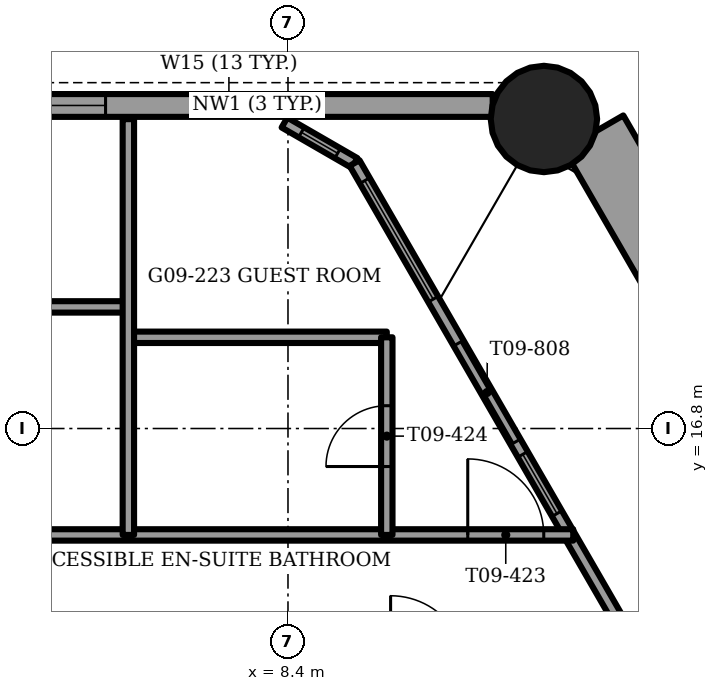
"""IFC4 building model, lengths in metres.
Left out: names, types, materials, properties, quantities, classifications, styles, units other than length and angle.
Written with IfcOpenShell. Run it as: python <this file> out.ifc"""

import sys

from ifc_helpers import new_model, si_unit, direction, frame, frame_2d, origin, origin_2d, place, context, subcontext, project, spatial, rectangle, circle, extrude, element, fill, save


model = new_model("IFC4")
c1 = context("Model", 3, precision=1e-05, world=origin(), true_north=direction((0.0, 1.0)))
c2 = subcontext(c1, "Body", "Model", "MODEL_VIEW")
j1 = project(units=[si_unit("LENGTHUNIT", "METRE"), si_unit("PLANEANGLEUNIT", "RADIAN")], contexts=[c1])
p1 = place(None, origin())
s1 = spatial("IfcSite", under=j1, at=p1, CompositionType="ELEMENT")
p2 = place(p1, origin())
s2 = spatial("IfcBuilding", under=s1, at=p2, CompositionType="ELEMENT")
p3 = place(p2, frame((0.0, 0.0, 39.25)))
s3 = spatial("IfcBuildingStorey", under=s2, at=p3, CompositionType="ELEMENT", Elevation=39.25)
p4 = place(p3, frame((11.767, 20.872, -1.2), z_axis=(0.0, 0.0, 1.0), x_axis=(1.0, 0.0, 0.0)))
e1 = element("IfcColumn", 1, at=p4, inside=s3, PredefinedType="COLUMN", context=c2, shape_type="SweptSolid", body=[
    extrude(circle(Radius=0.7, at=origin_2d()), origin(), (0.0, 0.0, 1.0), 3.75),
])
p5 = place(p3, frame((15.844, 14.766, 0.0), z_axis=(0.0, 0.0, 1.0), x_axis=(-0.499994135611, 0.866028789565, 0.0)))
e2 = element("IfcWall", 2, at=p5, inside=s3, PredefinedType="PARAPET", context=c2, shape_type="SweptSolid", body=[
    extrude(rectangle(XDim=6.845, YDim=0.9, at=frame_2d((3.423, 0.0))), origin(), (0.0, 0.0, 1.0), 1.1),
])
p6 = place(p3, frame((11.093, 21.05, 0.0), z_axis=(0.0, 0.0, 1.0), x_axis=(-1.0, 0.0, 0.0)))
e3 = element("IfcWall", 3, at=p6, inside=s3, PredefinedType="SOLIDWALL", context=c2, shape_type="SweptSolid", body=[
    extrude(rectangle(XDim=6.198, YDim=0.3, at=frame_2d((3.099, 0.0))), origin(), (0.0, 0.0, 1.0), 2.55),
])
p7 = place(p6, frame((3.02, 0.0, 0.15)))
e4 = element("IfcOpeningElement", 4, at=p7, cuts=e3, PredefinedType="OPENING", context=c2, shape_type="SweptSolid", body=[
    extrude(rectangle(XDim=0.9, YDim=2.15, at=frame_2d((0.45, 1.075))), frame((0.0, 0.15, 0.0), z_axis=(0.0, -1.0, 0.0), x_axis=(1.0, 0.0, 0.0)), (0.0, 0.0, 1.0), 0.3),
])
p8 = place(p6, frame((5.093, 0.0, 0.15)))
e5 = element("IfcOpeningElement", 5, at=p8, cuts=e3, PredefinedType="OPENING", context=c2, shape_type="SweptSolid", body=[
    extrude(rectangle(XDim=0.9, YDim=2.15, at=frame_2d((0.45, 1.075))), frame((0.0, 0.15, 0.0), z_axis=(0.0, -1.0, 0.0), x_axis=(1.0, 0.0, 0.0)), (0.0, 0.0, 1.0), 0.3),
])
p9 = place(p3, frame((20.826, 0.287, 0.0), z_axis=(0.0, 0.0, 1.0), x_axis=(-0.500006057782, 0.866021906294, 0.0)))
e6 = element("IfcWall", 6, at=p9, inside=s3, PredefinedType="SOLIDWALL", context=c2, shape_type="SweptSolid", body=[
    extrude(rectangle(XDim=23.1, YDim=0.15, at=frame_2d((11.55, 0.0))), origin(), (0.0, 0.0, 1.0), 3.45),
])
p10 = place(p9, frame((4.165, 0.0, 0.15)))
e7 = element("IfcOpeningElement", 7, at=p10, cuts=e6, PredefinedType="OPENING", context=c2, shape_type="SweptSolid", body=[
    extrude(rectangle(XDim=0.9, YDim=2.85, at=frame_2d((0.45, 1.425))), frame((0.0, 0.075, 0.0), z_axis=(0.0, -1.0, 0.0), x_axis=(1.0, 0.0, 0.0)), (0.0, 0.0, 1.0), 0.15),
])
p11 = place(p9, frame((5.645, 0.0, 0.15)))
e8 = element("IfcOpeningElement", 8, at=p11, cuts=e6, PredefinedType="OPENING", context=c2, shape_type="SweptSolid", body=[
    extrude(rectangle(XDim=1.5, YDim=2.85, at=frame_2d((0.75, 1.425))), frame((0.0, 0.075, 0.0), z_axis=(0.0, -1.0, 0.0), x_axis=(1.0, 0.0, 0.0)), (0.0, 0.0, 1.0), 0.15),
])
p12 = place(p9, frame((8.365, 0.0, 0.15)))
e9 = element("IfcOpeningElement", 9, at=p12, cuts=e6, PredefinedType="OPENING", context=c2, shape_type="SweptSolid", body=[
    extrude(rectangle(XDim=1.8, YDim=2.85, at=frame_2d((0.9, 1.425))), frame((0.0, 0.075, 0.0), z_axis=(0.0, -1.0, 0.0), x_axis=(1.0, 0.0, 0.0)), (0.0, 0.0, 1.0), 0.15),
])
p13 = place(p9, frame((10.465, 0.0, 0.15)))
e10 = element("IfcOpeningElement", 10, at=p13, cuts=e6, PredefinedType="OPENING", context=c2, shape_type="SweptSolid", body=[
    extrude(rectangle(XDim=1.5, YDim=2.85, at=frame_2d((0.75, 1.425))), frame((0.0, 0.075, 0.0), z_axis=(0.0, -1.0, 0.0), x_axis=(1.0, 0.0, 0.0)), (0.0, 0.0, 1.0), 0.15),
])
p14 = place(p9, frame((12.564, 0.0, 0.15)))
e11 = element("IfcOpeningElement", 11, at=p14, cuts=e6, PredefinedType="OPENING", context=c2, shape_type="SweptSolid", body=[
    extrude(rectangle(XDim=0.9, YDim=2.85, at=frame_2d((0.45, 1.425))), frame((0.0, 0.075, 0.0), z_axis=(0.0, -1.0, 0.0), x_axis=(1.0, 0.0, 0.0)), (0.0, 0.0, 1.0), 0.15),
])
p15 = place(p9, frame((14.665, 0.0, 0.15)))
e12 = element("IfcOpeningElement", 12, at=p15, cuts=e6, PredefinedType="OPENING", context=c2, shape_type="SweptSolid", body=[
    extrude(rectangle(XDim=1.5, YDim=2.85, at=frame_2d((0.75, 1.425))), frame((0.0, 0.075, 0.0), z_axis=(0.0, -1.0, 0.0), x_axis=(1.0, 0.0, 0.0)), (0.0, 0.0, 1.0), 0.15),
])
p16 = place(p9, frame((17.775, 0.0, 0.15)))
e13 = element("IfcOpeningElement", 13, at=p16, cuts=e6, PredefinedType="OPENING", context=c2, shape_type="SweptSolid", body=[
    extrude(rectangle(XDim=0.9, YDim=2.85, at=frame_2d((0.45, 1.425))), frame((0.0, 0.075, 0.0), z_axis=(0.0, -1.0, 0.0), x_axis=(1.0, 0.0, 0.0)), (0.0, 0.0, 1.0), 0.15),
])
p17 = place(p9, frame((18.865, 0.0, 0.0)))
e14 = element("IfcOpeningElement", 14, at=p17, cuts=e6, PredefinedType="OPENING", context=c2, shape_type="SweptSolid", body=[
    extrude(rectangle(XDim=1.5, YDim=2.4, at=frame_2d((0.75, 1.2))), frame((0.0, 0.075, 0.0), z_axis=(0.0, -1.0, 0.0), x_axis=(1.0, 0.0, 0.0)), (0.0, 0.0, 1.0), 0.15),
])
p18 = place(p9, frame((0.322, 0.0, 0.15)))
e15 = element("IfcOpeningElement", 15, at=p18, cuts=e6, PredefinedType="OPENING", context=c2, shape_type="SweptSolid", body=[
    extrude(rectangle(XDim=1.8, YDim=2.73, at=frame_2d((0.9, 1.365))), frame((0.0, 0.075, 0.0), z_axis=(0.0, -1.0, 0.0), x_axis=(1.0, 0.0, 0.0)), (0.0, 0.0, 1.0), 0.15),
])
p19 = place(p9, frame((21.032, 0.0, 0.15)))
e16 = element("IfcOpeningElement", 16, at=p19, cuts=e6, PredefinedType="OPENING", context=c2, shape_type="SweptSolid", body=[
    extrude(rectangle(XDim=1.8, YDim=2.73, at=frame_2d((0.9, 1.365))), frame((0.0, 0.075, 0.0), z_axis=(0.0, -1.0, 0.0), x_axis=(1.0, 0.0, 0.0)), (0.0, 0.0, 1.0), 0.15),
])
p20 = place(p3, frame((9.276, 20.292, 0.0), z_axis=(0.0, 0.0, 1.0), x_axis=(-0.865990848561, 0.500059846627, 0.0)))
e17 = element("IfcWall", 17, at=p20, inside=s3, PredefinedType="SOLIDWALL", context=c2, shape_type="SweptSolid", body=[
    extrude(rectangle(XDim=1.065, YDim=0.15, at=frame_2d((0.532, 0.0))), origin(), (0.0, 0.0, 1.0), 3.45),
])
p21 = place(p20, frame((0.258, 0.0, 0.15)))
e18 = element("IfcOpeningElement", 18, at=p21, cuts=e17, PredefinedType="OPENING", context=c2, shape_type="SweptSolid", body=[
    extrude(rectangle(XDim=0.55, YDim=2.85, at=frame_2d((0.275, 1.425))), frame((0.0, 0.075, 0.0), z_axis=(0.0, -1.0, 0.0), x_axis=(1.0, 0.0, 0.0)), (0.0, 0.0, 1.0), 0.15),
])
p22 = place(p3, frame((-12.153, 15.4, 0.0), z_axis=(0.0, 0.0, 1.0), x_axis=(1.0, 0.0, 0.0)))
e19 = element("IfcWall", 19, at=p22, inside=s3, PredefinedType="PARTITIONING", context=c2, shape_type="SweptSolid", body=[
    extrude(rectangle(XDim=24.306, YDim=0.15, at=frame_2d((12.153, 0.0))), origin(), (0.0, 0.0, 1.0), 3.45),
])
p23 = place(p22, frame((3.353, 0.0, 0.0)))
e20 = element("IfcOpeningElement", 20, at=p23, cuts=e19, PredefinedType="OPENING", context=c2, shape_type="SweptSolid", body=[
    extrude(rectangle(XDim=1.0, YDim=2.1, at=frame_2d((0.5, 1.05))), frame((0.0, 0.075, 0.0), z_axis=(0.0, -1.0, 0.0), x_axis=(1.0, 0.0, 0.0)), (0.0, 0.0, 1.0), 0.15),
])
p24 = place(p22, frame((12.153, 0.0, 0.0)))
e21 = element("IfcOpeningElement", 21, at=p24, cuts=e19, PredefinedType="OPENING", context=c2, shape_type="SweptSolid", body=[
    extrude(rectangle(XDim=1.0, YDim=2.1, at=frame_2d((0.5, 1.05))), frame((0.0, 0.075, 0.0), z_axis=(0.0, -1.0, 0.0), x_axis=(1.0, 0.0, 0.0)), (0.0, 0.0, 1.0), 0.15),
])
p25 = place(p22, frame((14.503, 0.0, 0.0)))
e22 = element("IfcOpeningElement", 22, at=p25, cuts=e19, PredefinedType="OPENING", context=c2, shape_type="SweptSolid", body=[
    extrude(rectangle(XDim=1.0, YDim=2.1, at=frame_2d((0.5, 1.05))), frame((0.0, 0.075, 0.0), z_axis=(0.0, -1.0, 0.0), x_axis=(1.0, 0.0, 0.0)), (0.0, 0.0, 1.0), 0.15),
])
p26 = place(p22, frame((22.918, 0.0, 0.0)))
e23 = element("IfcOpeningElement", 23, at=p26, cuts=e19, PredefinedType="OPENING", context=c2, shape_type="SweptSolid", body=[
    extrude(rectangle(XDim=1.0, YDim=2.1, at=frame_2d((0.5, 1.05))), frame((0.0, 0.075, 0.0), z_axis=(0.0, -1.0, 0.0), x_axis=(1.0, 0.0, 0.0)), (0.0, 0.0, 1.0), 0.15),
])
p27 = place(p3, frame((6.3, 18.0, 0.0), z_axis=(0.0, 0.0, 1.0), x_axis=(1.0, 0.0, 0.0)))
e24 = element("IfcWall", 24, at=p27, inside=s3, PredefinedType="PARTITIONING", context=c2, shape_type="SweptSolid", body=[
    extrude(rectangle(XDim=3.4, YDim=0.15, at=frame_2d((1.7, 0.0))), origin(), (0.0, 0.0, 1.0), 3.45),
])
p28 = place(p3, frame((3.5, 18.4, 0.0), z_axis=(0.0, 0.0, 1.0), x_axis=(1.0, 0.0, 0.0)))
e25 = element("IfcWall", 25, at=p28, inside=s3, PredefinedType="PARTITIONING", context=c2, shape_type="SweptSolid", body=[
    extrude(rectangle(XDim=2.8, YDim=0.15, at=frame_2d((1.4, 0.0))), origin(), (0.0, 0.0, 1.0), 3.45),
])
p29 = place(p3, frame((9.7, 15.4, 0.0), z_axis=(0.0, 0.0, 1.0), x_axis=(0.0, 1.0, 0.0)))
e26 = element("IfcWall", 26, at=p29, inside=s3, PredefinedType="PARTITIONING", context=c2, shape_type="SweptSolid", body=[
    extrude(rectangle(XDim=2.6, YDim=0.15, at=frame_2d((1.3, 0.0))), origin(), (0.0, 0.0, 1.0), 3.45),
])
p30 = place(p29, frame((0.9, 0.0, 0.0)))
e27 = element("IfcOpeningElement", 27, at=p30, cuts=e26, PredefinedType="OPENING", context=c2, shape_type="SweptSolid", body=[
    extrude(rectangle(XDim=0.8, YDim=2.1, at=frame_2d((0.4, 1.05))), frame((0.0, 0.075, 0.0), z_axis=(0.0, -1.0, 0.0), x_axis=(1.0, 0.0, 0.0)), (0.0, 0.0, 1.0), 0.15),
])
p31 = place(p3, frame((6.3, 15.4, 0.0), z_axis=(0.0, 0.0, 1.0), x_axis=(0.0, 1.0, 0.0)))
e28 = element("IfcWall", 28, at=p31, inside=s3, PredefinedType="PARTITIONING", context=c2, shape_type="SweptSolid", body=[
    extrude(rectangle(XDim=5.47, YDim=0.15, at=frame_2d((2.735, 0.0))), origin(), (0.0, 0.0, 1.0), 3.45),
])
p32 = place(p7, origin())
e29 = element("IfcWindow", 29, at=p32, inside=s3, PartitioningType="SINGLE_PANEL", PredefinedType="WINDOW", context=c2, shape_type="SweptSolid", body=[
    extrude(rectangle(XDim=0.9, YDim=2.15, at=frame_2d((0.45, 1.075))), frame((0.0, 0.03, 0.0), z_axis=(0.0, -1.0, 0.0), x_axis=(1.0, 0.0, 0.0)), (0.0, 0.0, 1.0), 0.06),
])
fill(e4, e29)
p33 = place(p8, origin())
e30 = element("IfcWindow", 30, at=p33, inside=s3, PartitioningType="SINGLE_PANEL", PredefinedType="WINDOW", context=c2, shape_type="SweptSolid", body=[
    extrude(rectangle(XDim=0.9, YDim=2.15, at=frame_2d((0.45, 1.075))), frame((0.0, 0.03, 0.0), z_axis=(0.0, -1.0, 0.0), x_axis=(1.0, 0.0, 0.0)), (0.0, 0.0, 1.0), 0.06),
])
fill(e5, e30)
p34 = place(p16, origin())
e31 = element("IfcWindow", 31, at=p34, inside=s3, PartitioningType="SINGLE_PANEL", PredefinedType="WINDOW", context=c2, shape_type="SweptSolid", body=[
    extrude(rectangle(XDim=0.9, YDim=2.85, at=frame_2d((0.45, 1.425))), frame((0.0, 0.03, 0.0), z_axis=(0.0, -1.0, 0.0), x_axis=(1.0, 0.0, 0.0)), (0.0, 0.0, 1.0), 0.06),
])
fill(e13, e31)
p35 = place(p17, origin())
e32 = element("IfcDoor", 32, at=p35, inside=s3, OperationType="SLIDING_TO_LEFT", PredefinedType="DOOR", context=c2, shape_type="SweptSolid", body=[
    extrude(rectangle(XDim=1.5, YDim=2.4, at=frame_2d((0.75, 1.2))), frame((0.0, 0.025, 0.0), z_axis=(0.0, -1.0, 0.0), x_axis=(1.0, 0.0, 0.0)), (0.0, 0.0, 1.0), 0.05),
])
fill(e14, e32)
p36 = place(p19, origin())
e33 = element("IfcWindow", 33, at=p36, inside=s3, PartitioningType="SINGLE_PANEL", PredefinedType="WINDOW", context=c2, shape_type="SweptSolid", body=[
    extrude(rectangle(XDim=1.8, YDim=2.73, at=frame_2d((0.9, 1.365))), frame((0.0, 0.03, 0.0), z_axis=(0.0, -1.0, 0.0), x_axis=(1.0, 0.0, 0.0)), (0.0, 0.0, 1.0), 0.06),
])
fill(e16, e33)
p37 = place(p21, origin())
e34 = element("IfcWindow", 34, at=p37, inside=s3, PartitioningType="SINGLE_PANEL", PredefinedType="WINDOW", context=c2, shape_type="SweptSolid", body=[
    extrude(rectangle(XDim=0.55, YDim=2.85, at=frame_2d((0.275, 1.425))), frame((0.0, 0.03, 0.0), z_axis=(0.0, -1.0, 0.0), x_axis=(1.0, 0.0, 0.0)), (0.0, 0.0, 1.0), 0.06),
])
fill(e18, e34)
p38 = place(p26, origin())
e35 = element("IfcDoor", 35, at=p38, inside=s3, OperationType="SINGLE_SWING_RIGHT", PredefinedType="DOOR", context=c2, shape_type="SweptSolid", body=[
    extrude(rectangle(XDim=1.0, YDim=2.1, at=frame_2d((0.5, 1.05))), frame((0.0, 0.025, 0.0), z_axis=(0.0, -1.0, 0.0), x_axis=(1.0, 0.0, 0.0)), (0.0, 0.0, 1.0), 0.05),
])
fill(e23, e35)
p39 = place(p30, origin())
e36 = element("IfcDoor", 36, at=p39, inside=s3, OperationType="SINGLE_SWING_LEFT", PredefinedType="DOOR", context=c2, shape_type="SweptSolid", body=[
    extrude(rectangle(XDim=0.8, YDim=2.1, at=frame_2d((0.4, 1.05))), frame((0.0, 0.025, 0.0), z_axis=(0.0, -1.0, 0.0), x_axis=(1.0, 0.0, 0.0)), (0.0, 0.0, 1.0), 0.05),
])
fill(e27, e36)
save(model, sys.argv[1])
